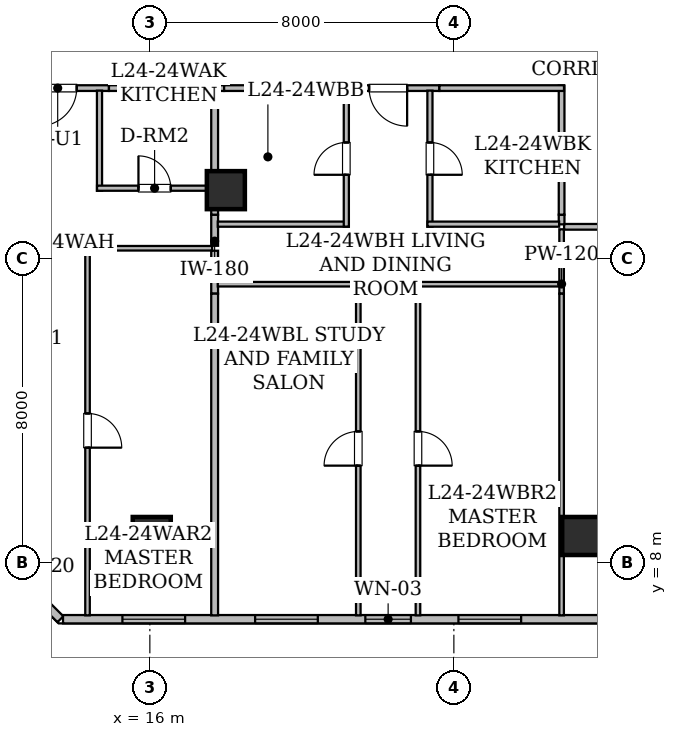
"""IFC4 building model, lengths in metres.
Left out: names, types, materials, properties, quantities, classifications, styles, units other than length and angle.
Written with IfcOpenShell. Run it as: python <this file> out.ifc"""

import sys

from ifc_helpers import new_model, si_unit, direction, frame, frame_2d, origin, origin_2d, place, context, subcontext, project, spatial, rectangle, hollow_rectangle, extrude, element, fill, save


model = new_model("IFC4")
c1 = context("Model", 3, precision=1e-05, world=origin(), true_north=direction((0.0, 1.0)))
c2 = subcontext(c1, "Body", "Model", "MODEL_VIEW")
j1 = project(units=[si_unit("LENGTHUNIT", "METRE"), si_unit("PLANEANGLEUNIT", "RADIAN")], contexts=[c1])
p1 = place(None, origin())
s1 = spatial("IfcSite", under=j1, at=p1, CompositionType="ELEMENT")
p2 = place(p1, origin())
s2 = spatial("IfcBuilding", under=s1, at=p2, CompositionType="ELEMENT")
p3 = place(p2, frame((0.0, 0.0, 98.25)))
s3 = spatial("IfcBuildingStorey", under=s2, at=p3, CompositionType="ELEMENT", Elevation=98.25)
for number, where, z_axis, x_axis in (
    (1, (16.05, 8.7, 0.0), (0.0, 0.0, 1.0), (1.0, 0.0, 0.0)),
    (2, (27.35, 8.7, 0.0), (0.0, 0.0, 1.0), (1.0, 0.0, 0.0)),
    (3, (18.0, 17.8, 0.0), (0.0, 0.0, 1.0), (1.0, 0.0, 0.0)),
):
    element("IfcColumn", number, at=place(p3, frame(where, z_axis=z_axis, x_axis=x_axis)), inside=s3, PredefinedType="COLUMN", context=c2, shape_type="SweptSolid", body=[
        extrude(hollow_rectangle(XDim=1.0, YDim=1.0, WallThickness=0.05, at=origin_2d()), origin(), (0.0, 0.0, 1.0), 3.65),
    ])
p4 = place(p3, frame((13.646, 6.51, 0.0), z_axis=(0.0, 0.0, 1.0), x_axis=(-0.707106781187, 0.707106781187, 0.0)))
e4 = element("IfcWall", 4, at=p4, inside=s3, PredefinedType="STANDARD", context=c2, shape_type="SweptSolid", body=[
    extrude(rectangle(XDim=5.849, YDim=0.22, at=frame_2d((2.925, 0.0))), origin(), (0.0, 0.0, 1.0), 3.43),
])
p5 = place(p3, frame((52.283, 6.51, 0.0), z_axis=(0.0, 0.0, 1.0), x_axis=(-1.0, 0.0, 0.0)))
e5 = element("IfcWall", 5, at=p5, inside=s3, PredefinedType="STANDARD", context=c2, shape_type="SweptSolid", body=[
    extrude(rectangle(XDim=38.568, YDim=0.22, at=frame_2d((19.284, 0.0))), origin(), (0.0, 0.0, 1.0), 3.43),
])
p6 = place(p5, frame((21.108, 0.0, 0.85)))
e6 = element("IfcOpeningElement", 6, at=p6, cuts=e5, PredefinedType="OPENING", context=c2, shape_type="SweptSolid", body=[
    extrude(rectangle(XDim=1.65, YDim=1.55, at=frame_2d((0.825, 0.775))), frame((0.0, 0.12, 0.0), z_axis=(0.0, -1.0, 0.0), x_axis=(1.0, 0.0, 0.0)), (0.0, 0.0, 1.0), 0.24),
])
p7 = place(p5, frame((35.355, 0.0, 0.85)))
e7 = element("IfcOpeningElement", 7, at=p7, cuts=e5, PredefinedType="OPENING", context=c2, shape_type="SweptSolid", body=[
    extrude(rectangle(XDim=1.65, YDim=1.55, at=frame_2d((0.825, 0.775))), frame((0.0, 0.12, 0.0), z_axis=(0.0, -1.0, 0.0), x_axis=(1.0, 0.0, 0.0)), (0.0, 0.0, 1.0), 0.24),
])
p8 = place(p5, frame((29.413, 0.0, 0.8)))
e8 = element("IfcOpeningElement", 8, at=p8, cuts=e5, PredefinedType="OPENING", context=c2, shape_type="SweptSolid", body=[
    extrude(rectangle(XDim=1.2, YDim=1.5, at=frame_2d((0.6, 0.75))), frame((0.0, 0.12, 0.0), z_axis=(0.0, -1.0, 0.0), x_axis=(1.0, 0.0, 0.0)), (0.0, 0.0, 1.0), 0.24),
])
p9 = place(p5, frame((31.863, 0.0, 0.85)))
e9 = element("IfcOpeningElement", 9, at=p9, cuts=e5, PredefinedType="OPENING", context=c2, shape_type="SweptSolid", body=[
    extrude(rectangle(XDim=1.65, YDim=1.55, at=frame_2d((0.825, 0.775))), frame((0.0, 0.12, 0.0), z_axis=(0.0, -1.0, 0.0), x_axis=(1.0, 0.0, 0.0)), (0.0, 0.0, 1.0), 0.24),
])
p10 = place(p5, frame((26.513, 0.0, 0.85)))
e10 = element("IfcOpeningElement", 10, at=p10, cuts=e5, PredefinedType="OPENING", context=c2, shape_type="SweptSolid", body=[
    extrude(rectangle(XDim=1.65, YDim=1.55, at=frame_2d((0.825, 0.775))), frame((0.0, 0.12, 0.0), z_axis=(0.0, -1.0, 0.0), x_axis=(1.0, 0.0, 0.0)), (0.0, 0.0, 1.0), 0.24),
])
p11 = place(p5, frame((13.843, 0.0, 0.85)))
e11 = element("IfcOpeningElement", 11, at=p11, cuts=e5, PredefinedType="OPENING", context=c2, shape_type="SweptSolid", body=[
    extrude(rectangle(XDim=1.65, YDim=1.55, at=frame_2d((0.825, 0.775))), frame((0.0, 0.12, 0.0), z_axis=(0.0, -1.0, 0.0), x_axis=(1.0, 0.0, 0.0)), (0.0, 0.0, 1.0), 0.24),
])
p12 = place(p5, frame((1.479, 0.0, 0.85)))
e12 = element("IfcOpeningElement", 12, at=p12, cuts=e5, PredefinedType="OPENING", context=c2, shape_type="SweptSolid", body=[
    extrude(rectangle(XDim=1.65, YDim=1.55, at=frame_2d((0.825, 0.775))), frame((0.0, 0.12, 0.0), z_axis=(0.0, -1.0, 0.0), x_axis=(1.0, 0.0, 0.0)), (0.0, 0.0, 1.0), 0.24),
])
p13 = place(p3, frame((34.114, 16.835, 0.0), z_axis=(0.0, 0.0, 1.0), x_axis=(-1.0, 0.0, 0.0)))
e13 = element("IfcWall", 13, at=p13, inside=s3, PredefinedType="STANDARD", context=c2, shape_type="SweptSolid", body=[
    extrude(rectangle(XDim=7.214, YDim=0.15, at=frame_2d((3.607, 0.0))), origin(), (0.0, 0.0, 1.0), 2.647),
])
p14 = place(p13, frame((3.053, 0.0, 0.0)))
e14 = element("IfcOpeningElement", 14, at=p14, cuts=e13, PredefinedType="OPENING", context=c2, shape_type="SweptSolid", body=[
    extrude(rectangle(XDim=1.15, YDim=2.2, at=frame_2d((0.575, 1.1))), frame((0.0, 0.085, 0.0), z_axis=(0.0, -1.0, 0.0), x_axis=(1.0, 0.0, 0.0)), (0.0, 0.0, 1.0), 0.17),
])
p15 = place(p3, frame((14.924, 20.485, 0.0), z_axis=(0.0, 0.0, 1.0), x_axis=(-1.0, 0.0, 0.0)))
e15 = element("IfcWall", 15, at=p15, inside=s3, PredefinedType="STANDARD", context=c2, shape_type="SweptSolid", body=[
    extrude(rectangle(XDim=2.698, YDim=0.15, at=frame_2d((1.349, 0.0))), origin(), (0.0, 0.0, 1.0), 3.43),
])
p16 = place(p15, frame((0.849, 0.0, 0.0)))
e16 = element("IfcOpeningElement", 16, at=p16, cuts=e15, PredefinedType="OPENING", context=c2, shape_type="SweptSolid", body=[
    extrude(rectangle(XDim=1.0, YDim=2.15, at=frame_2d((0.5, 1.075))), frame((0.0, 0.085, 0.0), z_axis=(0.0, -1.0, 0.0), x_axis=(1.0, 0.0, 0.0)), (0.0, 0.0, 1.0), 0.17),
])
p17 = place(p3, frame((17.954, 20.485, 0.0), z_axis=(0.0, 0.0, 1.0), x_axis=(-1.0, 0.0, 0.0)))
e17 = element("IfcWall", 17, at=p17, inside=s3, PredefinedType="STANDARD", context=c2, shape_type="SweptSolid", body=[
    extrude(rectangle(XDim=3.03, YDim=0.15, at=frame_2d((1.515, 0.0))), origin(), (0.0, 0.0, 1.0), 2.647),
])
p18 = place(p3, frame((26.835, 16.9, 0.0), z_axis=(0.0, 0.0, 1.0), x_axis=(0.0, 1.0, 0.0)))
e18 = element("IfcWall", 18, at=p18, inside=s3, PredefinedType="STANDARD", context=c2, shape_type="SweptSolid", body=[
    extrude(rectangle(XDim=0.254, YDim=0.15, at=frame_2d((0.127, 0.0))), origin(), (0.0, 0.0, 1.0), 3.43),
])
p19 = place(p3, frame((23.619, 20.485, 0.0), z_axis=(0.0, 0.0, 1.0), x_axis=(-1.0, 0.0, 0.0)))
e19 = element("IfcWall", 19, at=p19, inside=s3, PredefinedType="STANDARD", context=c2, shape_type="SweptSolid", body=[
    extrude(rectangle(XDim=2.698, YDim=0.15, at=frame_2d((1.349, 0.0))), origin(), (0.0, 0.0, 1.0), 3.43),
])
p20 = place(p19, frame((0.849, 0.0, 0.0)))
e20 = element("IfcOpeningElement", 20, at=p20, cuts=e19, PredefinedType="OPENING", context=c2, shape_type="SweptSolid", body=[
    extrude(rectangle(XDim=1.0, YDim=2.15, at=frame_2d((0.5, 1.075))), frame((0.0, 0.085, 0.0), z_axis=(0.0, -1.0, 0.0), x_axis=(1.0, 0.0, 0.0)), (0.0, 0.0, 1.0), 0.17),
])
p21 = place(p3, frame((20.921, 20.485, 0.0), z_axis=(0.0, 0.0, 1.0), x_axis=(-1.0, 0.0, 0.0)))
e21 = element("IfcWall", 21, at=p21, inside=s3, PredefinedType="STANDARD", context=c2, shape_type="SweptSolid", body=[
    extrude(rectangle(XDim=2.967, YDim=0.15, at=frame_2d((1.483, 0.0))), origin(), (0.0, 0.0, 1.0), 2.647),
])
p22 = place(p3, frame((26.835, 17.154, 0.0), z_axis=(0.0, 0.0, 1.0), x_axis=(0.0, 1.0, 0.0)))
e22 = element("IfcWall", 22, at=p22, inside=s3, PredefinedType="STANDARD", context=c2, shape_type="SweptSolid", body=[
    extrude(rectangle(XDim=3.396, YDim=0.15, at=frame_2d((1.698, 0.0))), origin(), (0.0, 0.0, 1.0), 2.647),
])
p23 = place(p3, frame((26.898, 20.485, 0.0), z_axis=(0.0, 0.0, 1.0), x_axis=(-1.0, 0.0, 0.0)))
e23 = element("IfcWall", 23, at=p23, inside=s3, PredefinedType="STANDARD", context=c2, shape_type="SweptSolid", body=[
    extrude(rectangle(XDim=3.279, YDim=0.15, at=frame_2d((1.64, 0.0))), origin(), (0.0, 0.0, 1.0), 3.43),
])
p24 = place(p3, frame((26.835, 15.076, 0.0), z_axis=(0.0, 0.0, 1.0), x_axis=(0.0, 1.0, 0.0)))
e24 = element("IfcWall", 24, at=p24, inside=s3, PredefinedType="PARTITIONING", context=c2, shape_type="SweptSolid", body=[
    extrude(rectangle(XDim=1.694, YDim=0.12, at=frame_2d((0.847, 0.0))), origin(), (0.0, 0.0, 1.0), 3.43),
])
p25 = place(p3, frame((26.835, 6.612, 0.0), z_axis=(0.0, 0.0, 1.0), x_axis=(0.0, 1.0, 0.0)))
e25 = element("IfcWall", 25, at=p25, inside=s3, PredefinedType="PARTITIONING", context=c2, shape_type="SweptSolid", body=[
    extrude(rectangle(XDim=8.464, YDim=0.12, at=frame_2d((4.232, 0.0))), origin(), (0.0, 0.0, 1.0), 2.876),
])
p26 = place(p3, frame((14.675, 20.418, 0.0), z_axis=(0.0, 0.0, 1.0), x_axis=(0.0, -1.0, 0.0)))
e26 = element("IfcWall", 26, at=p26, inside=s3, PredefinedType="PARTITIONING", context=c2, shape_type="SweptSolid", body=[
    extrude(rectangle(XDim=2.632, YDim=0.135, at=frame_2d((1.316, 0.0))), origin(), (0.0, 0.0, 1.0), 2.647),
])
p27 = place(p3, frame((14.61, 17.851, 0.0), z_axis=(0.0, 0.0, 1.0), x_axis=(1.0, 0.0, 0.0)))
e27 = element("IfcWall", 27, at=p27, inside=s3, PredefinedType="PARTITIONING", context=c2, shape_type="SweptSolid", body=[
    extrude(rectangle(XDim=3.03, YDim=0.135, at=frame_2d((1.515, 0.0))), origin(), (0.0, 0.0, 1.0), 2.647),
])
p28 = place(p27, frame((1.09, 0.0, 0.0)))
e28 = element("IfcOpeningElement", 28, at=p28, cuts=e27, PredefinedType="OPENING", context=c2, shape_type="SweptSolid", body=[
    extrude(rectangle(XDim=0.85, YDim=2.1, at=frame_2d((0.425, 1.05))), frame((0.0, 0.077, 0.0), z_axis=(0.0, -1.0, 0.0), x_axis=(1.0, 0.0, 0.0)), (0.0, 0.0, 1.0), 0.155),
])
p29 = place(p3, frame((14.36, 16.336, 0.0), z_axis=(0.0, 0.0, 1.0), x_axis=(0.0, -1.0, 0.0)))
e29 = element("IfcWall", 29, at=p29, inside=s3, PredefinedType="PARTITIONING", context=c2, shape_type="SweptSolid", body=[
    extrude(rectangle(XDim=9.724, YDim=0.12, at=frame_2d((4.862, 0.0))), origin(), (0.0, 0.0, 1.0), 2.876),
])
p30 = place(p29, frame((4.412, 0.0, 0.0)))
e30 = element("IfcOpeningElement", 30, at=p30, cuts=e29, PredefinedType="OPENING", context=c2, shape_type="SweptSolid", body=[
    extrude(rectangle(XDim=0.9, YDim=2.1, at=frame_2d((0.45, 1.05))), frame((0.0, 0.07, 0.0), z_axis=(0.0, -1.0, 0.0), x_axis=(1.0, 0.0, 0.0)), (0.0, 0.0, 1.0), 0.14),
])
p31 = place(p3, frame((17.64, 16.271, 0.0), z_axis=(0.0, 0.0, 1.0), x_axis=(-1.0, 0.0, 0.0)))
e31 = element("IfcWall", 31, at=p31, inside=s3, PredefinedType="PARTITIONING", context=c2, shape_type="SweptSolid", body=[
    extrude(rectangle(XDim=3.345, YDim=0.12, at=frame_2d((1.672, 0.0))), origin(), (0.0, 0.0, 1.0), 2.647),
])
p32 = place(p3, frame((17.705, 17.154, 0.0), z_axis=(0.0, 0.0, 1.0), x_axis=(0.0, -1.0, 0.0)))
e32 = element("IfcWall", 32, at=p32, inside=s3, PredefinedType="STANDARD", context=c2, shape_type="SweptSolid", body=[
    extrude(rectangle(XDim=0.818, YDim=0.18, at=frame_2d((0.409, 0.0))), origin(), (0.0, 0.0, 1.0), 2.647),
])
p33 = place(p3, frame((17.705, 17.786, 0.0), z_axis=(0.0, 0.0, 1.0), x_axis=(0.0, -1.0, 0.0)))
e33 = element("IfcWall", 33, at=p33, inside=s3, PredefinedType="STANDARD", context=c2, shape_type="SweptSolid", body=[
    extrude(rectangle(XDim=0.632, YDim=0.18, at=frame_2d((0.316, 0.0))), origin(), (0.0, 0.0, 1.0), 2.647),
])
p34 = place(p3, frame((17.705, 20.418, 0.0), z_axis=(0.0, 0.0, 1.0), x_axis=(0.0, -1.0, 0.0)))
e34 = element("IfcWall", 34, at=p34, inside=s3, PredefinedType="STANDARD", context=c2, shape_type="SweptSolid", body=[
    extrude(rectangle(XDim=2.502, YDim=0.18, at=frame_2d((1.251, 0.0))), origin(), (0.0, 0.0, 1.0), 2.647),
])
p35 = place(p3, frame((17.705, 16.206, 0.0), z_axis=(0.0, 0.0, 1.0), x_axis=(0.0, -1.0, 0.0)))
e35 = element("IfcWall", 35, at=p35, inside=s3, PredefinedType="STANDARD", context=c2, shape_type="SweptSolid", body=[
    extrude(rectangle(XDim=1.13, YDim=0.18, at=frame_2d((0.565, 0.0))), origin(), (0.0, 0.0, 1.0), 2.647),
])
p36 = place(p3, frame((17.705, 15.076, 0.0), z_axis=(0.0, 0.0, 1.0), x_axis=(0.0, -1.0, 0.0)))
e36 = element("IfcWall", 36, at=p36, inside=s3, PredefinedType="STANDARD", context=c2, shape_type="SweptSolid", body=[
    extrude(rectangle(XDim=8.464, YDim=0.18, at=frame_2d((4.232, 0.0))), origin(), (0.0, 0.0, 1.0), 2.647),
])
p37 = place(p3, frame((17.787, 16.905, 0.0), z_axis=(0.0, 0.0, 1.0), x_axis=(1.0, 0.0, 0.0)))
e37 = element("IfcWall", 37, at=p37, inside=s3, PredefinedType="PARTITIONING", context=c2, shape_type="SweptSolid", body=[
    extrude(rectangle(XDim=3.448, YDim=0.135, at=frame_2d((1.724, 0.0))), origin(), (0.0, 0.0, 1.0), 2.647),
])
p38 = place(p3, frame((21.17, 16.84, 0.0), z_axis=(0.0, 0.0, 1.0), x_axis=(0.0, 1.0, 0.0)))
e38 = element("IfcWall", 38, at=p38, inside=s3, PredefinedType="PARTITIONING", context=c2, shape_type="SweptSolid", body=[
    extrude(rectangle(XDim=3.578, YDim=0.135, at=frame_2d((1.789, 0.0))), origin(), (0.0, 0.0, 1.0), 2.647),
])
p39 = place(p38, frame((1.364, 0.0, 0.0)))
e39 = element("IfcOpeningElement", 39, at=p39, cuts=e38, PredefinedType="OPENING", context=c2, shape_type="SweptSolid", body=[
    extrude(rectangle(XDim=0.85, YDim=2.1, at=frame_2d((0.425, 1.05))), frame((0.0, 0.077, 0.0), z_axis=(0.0, -1.0, 0.0), x_axis=(1.0, 0.0, 0.0)), (0.0, 0.0, 1.0), 0.155),
])
p40 = place(p3, frame((23.37, 20.418, 0.0), z_axis=(0.0, 0.0, 1.0), x_axis=(0.0, -1.0, 0.0)))
e40 = element("IfcWall", 40, at=p40, inside=s3, PredefinedType="PARTITIONING", context=c2, shape_type="SweptSolid", body=[
    extrude(rectangle(XDim=3.578, YDim=0.135, at=frame_2d((1.789, 0.0))), origin(), (0.0, 0.0, 1.0), 2.647),
])
p41 = place(p40, frame((1.364, 0.0, 0.0)))
e41 = element("IfcOpeningElement", 41, at=p41, cuts=e40, PredefinedType="OPENING", context=c2, shape_type="SweptSolid", body=[
    extrude(rectangle(XDim=0.85, YDim=2.1, at=frame_2d((0.425, 1.05))), frame((0.0, 0.077, 0.0), z_axis=(0.0, -1.0, 0.0), x_axis=(1.0, 0.0, 0.0)), (0.0, 0.0, 1.0), 0.155),
])
p42 = place(p3, frame((23.305, 16.905, 0.0), z_axis=(0.0, 0.0, 1.0), x_axis=(1.0, 0.0, 0.0)))
e42 = element("IfcWall", 42, at=p42, inside=s3, PredefinedType="PARTITIONING", context=c2, shape_type="SweptSolid", body=[
    extrude(rectangle(XDim=3.465, YDim=0.135, at=frame_2d((1.732, 0.0))), origin(), (0.0, 0.0, 1.0), 3.43),
])
p43 = place(p3, frame((21.485, 6.612, 0.0), z_axis=(0.0, 0.0, 1.0), x_axis=(0.0, 1.0, 0.0)))
e43 = element("IfcWall", 43, at=p43, inside=s3, PredefinedType="PARTITIONING", context=c2, shape_type="SweptSolid", body=[
    extrude(rectangle(XDim=8.778, YDim=0.12, at=frame_2d((4.389, 0.0))), origin(), (0.0, 0.0, 1.0), 2.876),
])
p44 = place(p43, frame((3.939, 0.0, 0.0)))
e44 = element("IfcOpeningElement", 44, at=p44, cuts=e43, PredefinedType="OPENING", context=c2, shape_type="SweptSolid", body=[
    extrude(rectangle(XDim=0.9, YDim=2.1, at=frame_2d((0.45, 1.05))), frame((0.0, 0.07, 0.0), z_axis=(0.0, -1.0, 0.0), x_axis=(1.0, 0.0, 0.0)), (0.0, 0.0, 1.0), 0.14),
])
p45 = place(p3, frame((21.55, 15.325, 0.0), z_axis=(0.0, 0.0, 1.0), x_axis=(-1.0, 0.0, 0.0)))
e45 = element("IfcWall", 45, at=p45, inside=s3, PredefinedType="PARTITIONING", context=c2, shape_type="SweptSolid", body=[
    extrude(rectangle(XDim=3.763, YDim=0.12, at=frame_2d((1.881, 0.0))), origin(), (0.0, 0.0, 1.0), 3.43),
])
p46 = place(p3, frame((26.781, 15.325, 0.0), z_axis=(0.0, 0.0, 1.0), x_axis=(-1.0, 0.0, 0.0)))
e46 = element("IfcWall", 46, at=p46, inside=s3, PredefinedType="PARTITIONING", context=c2, shape_type="SweptSolid", body=[
    extrude(rectangle(XDim=3.791, YDim=0.12, at=frame_2d((1.896, 0.0))), origin(), (0.0, 0.0, 1.0), 3.43),
])
p47 = place(p3, frame((23.055, 15.39, 0.0), z_axis=(0.0, 0.0, 1.0), x_axis=(0.0, -1.0, 0.0)))
e47 = element("IfcWall", 47, at=p47, inside=s3, PredefinedType="PARTITIONING", context=c2, shape_type="SweptSolid", body=[
    extrude(rectangle(XDim=8.778, YDim=0.12, at=frame_2d((4.389, 0.0))), origin(), (0.0, 0.0, 1.0), 2.876),
])
p48 = place(p47, frame((3.939, 0.0, 0.0)))
e48 = element("IfcOpeningElement", 48, at=p48, cuts=e47, PredefinedType="OPENING", context=c2, shape_type="SweptSolid", body=[
    extrude(rectangle(XDim=0.9, YDim=2.1, at=frame_2d((0.45, 1.05))), frame((0.0, 0.07, 0.0), z_axis=(0.0, -1.0, 0.0), x_axis=(1.0, 0.0, 0.0)), (0.0, 0.0, 1.0), 0.14),
])
p49 = place(p7, origin())
e49 = element("IfcWindow", 49, at=p49, inside=s3, PartitioningType="SINGLE_PANEL", PredefinedType="WINDOW", context=c2, shape_type="SweptSolid", body=[
    extrude(rectangle(XDim=1.65, YDim=1.55, at=frame_2d((0.825, 0.775))), frame((0.0, 0.03, 0.0), z_axis=(0.0, -1.0, 0.0), x_axis=(1.0, 0.0, 0.0)), (0.0, 0.0, 1.0), 0.06),
])
fill(e7, e49)
p50 = place(p8, origin())
e50 = element("IfcWindow", 50, at=p50, inside=s3, PartitioningType="SINGLE_PANEL", PredefinedType="WINDOW", context=c2, shape_type="SweptSolid", body=[
    extrude(rectangle(XDim=1.2, YDim=1.5, at=frame_2d((0.6, 0.75))), frame((0.0, 0.03, 0.0), z_axis=(0.0, -1.0, 0.0), x_axis=(1.0, 0.0, 0.0)), (0.0, 0.0, 1.0), 0.06),
])
fill(e8, e50)
p51 = place(p9, origin())
e51 = element("IfcWindow", 51, at=p51, inside=s3, PartitioningType="SINGLE_PANEL", PredefinedType="WINDOW", context=c2, shape_type="SweptSolid", body=[
    extrude(rectangle(XDim=1.65, YDim=1.55, at=frame_2d((0.825, 0.775))), frame((0.0, 0.03, 0.0), z_axis=(0.0, -1.0, 0.0), x_axis=(1.0, 0.0, 0.0)), (0.0, 0.0, 1.0), 0.06),
])
fill(e9, e51)
p52 = place(p10, origin())
e52 = element("IfcWindow", 52, at=p52, inside=s3, PartitioningType="SINGLE_PANEL", PredefinedType="WINDOW", context=c2, shape_type="SweptSolid", body=[
    extrude(rectangle(XDim=1.65, YDim=1.55, at=frame_2d((0.825, 0.775))), frame((0.0, 0.03, 0.0), z_axis=(0.0, -1.0, 0.0), x_axis=(1.0, 0.0, 0.0)), (0.0, 0.0, 1.0), 0.06),
])
fill(e10, e52)
p53 = place(p16, origin())
e53 = element("IfcDoor", 53, at=p53, inside=s3, OperationType="SINGLE_SWING_RIGHT", PredefinedType="DOOR", context=c2, shape_type="SweptSolid", body=[
    extrude(rectangle(XDim=1.0, YDim=2.15, at=frame_2d((0.5, 1.075))), frame((0.0, 0.025, 0.0), z_axis=(0.0, -1.0, 0.0), x_axis=(1.0, 0.0, 0.0)), (0.0, 0.0, 1.0), 0.05),
])
fill(e16, e53)
p54 = place(p20, origin())
e54 = element("IfcDoor", 54, at=p54, inside=s3, OperationType="SINGLE_SWING_LEFT", PredefinedType="DOOR", context=c2, shape_type="SweptSolid", body=[
    extrude(rectangle(XDim=1.0, YDim=2.15, at=frame_2d((0.5, 1.075))), frame((0.0, 0.025, 0.0), z_axis=(0.0, -1.0, 0.0), x_axis=(1.0, 0.0, 0.0)), (0.0, 0.0, 1.0), 0.05),
])
fill(e20, e54)
p55 = place(p28, origin())
e55 = element("IfcDoor", 55, at=p55, inside=s3, OperationType="SINGLE_SWING_LEFT", PredefinedType="DOOR", context=c2, shape_type="SweptSolid", body=[
    extrude(rectangle(XDim=0.85, YDim=2.1, at=frame_2d((0.425, 1.05))), frame((0.0, 0.025, 0.0), z_axis=(0.0, -1.0, 0.0), x_axis=(1.0, 0.0, 0.0)), (0.0, 0.0, 1.0), 0.05),
])
fill(e28, e55)
p56 = place(p30, origin())
e56 = element("IfcDoor", 56, at=p56, inside=s3, OperationType="SINGLE_SWING_RIGHT", PredefinedType="DOOR", context=c2, shape_type="SweptSolid", body=[
    extrude(rectangle(XDim=0.9, YDim=2.1, at=frame_2d((0.45, 1.05))), frame((0.0, 0.025, 0.0), z_axis=(0.0, -1.0, 0.0), x_axis=(1.0, 0.0, 0.0)), (0.0, 0.0, 1.0), 0.05),
])
fill(e30, e56)
p57 = place(p39, origin())
e57 = element("IfcDoor", 57, at=p57, inside=s3, OperationType="SINGLE_SWING_LEFT", PredefinedType="DOOR", context=c2, shape_type="SweptSolid", body=[
    extrude(rectangle(XDim=0.85, YDim=2.1, at=frame_2d((0.425, 1.05))), frame((0.0, 0.025, 0.0), z_axis=(0.0, -1.0, 0.0), x_axis=(1.0, 0.0, 0.0)), (0.0, 0.0, 1.0), 0.05),
])
fill(e39, e57)
p58 = place(p41, origin())
e58 = element("IfcDoor", 58, at=p58, inside=s3, OperationType="SINGLE_SWING_RIGHT", PredefinedType="DOOR", context=c2, shape_type="SweptSolid", body=[
    extrude(rectangle(XDim=0.85, YDim=2.1, at=frame_2d((0.425, 1.05))), frame((0.0, 0.025, 0.0), z_axis=(0.0, -1.0, 0.0), x_axis=(1.0, 0.0, 0.0)), (0.0, 0.0, 1.0), 0.05),
])
fill(e41, e58)
p59 = place(p44, origin())
e59 = element("IfcDoor", 59, at=p59, inside=s3, OperationType="SINGLE_SWING_LEFT", PredefinedType="DOOR", context=c2, shape_type="SweptSolid", body=[
    extrude(rectangle(XDim=0.9, YDim=2.1, at=frame_2d((0.45, 1.05))), frame((0.0, 0.025, 0.0), z_axis=(0.0, -1.0, 0.0), x_axis=(1.0, 0.0, 0.0)), (0.0, 0.0, 1.0), 0.05),
])
fill(e44, e59)
p60 = place(p48, origin())
e60 = element("IfcDoor", 60, at=p60, inside=s3, OperationType="SINGLE_SWING_RIGHT", PredefinedType="DOOR", context=c2, shape_type="SweptSolid", body=[
    extrude(rectangle(XDim=0.9, YDim=2.1, at=frame_2d((0.45, 1.05))), frame((0.0, 0.025, 0.0), z_axis=(0.0, -1.0, 0.0), x_axis=(1.0, 0.0, 0.0)), (0.0, 0.0, 1.0), 0.05),
])
fill(e48, e60)
save(model, sys.argv[1])
